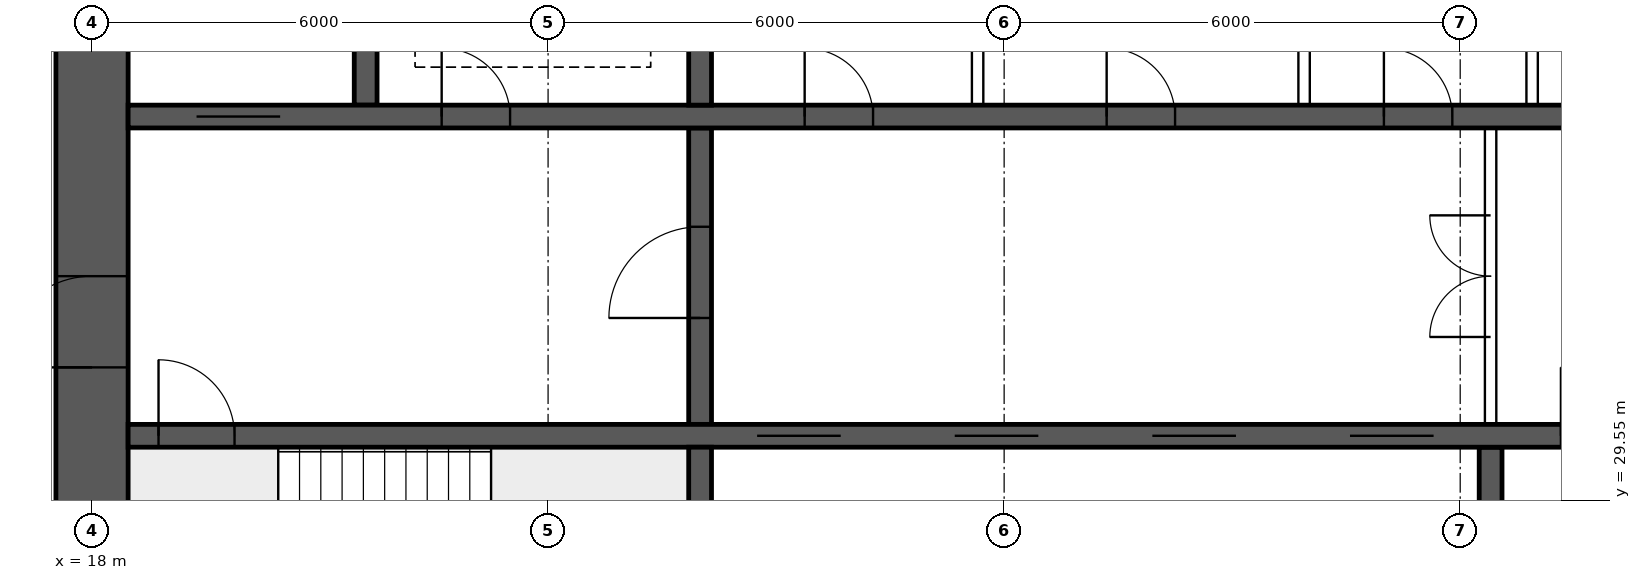
"""IFC4 building model, lengths in metres.
Left out: names, types, materials, properties, quantities, classifications, styles, units other than length and angle.
Written with IfcOpenShell. Run it as: python <this file> out.ifc"""

import sys

from ifc_helpers import new_model, si_unit, direction, frame, frame_2d, origin, place, context, subcontext, project, spatial, rectangle, extrude, element, fill, save


model = new_model("IFC4")
c1 = context("Model", 3, precision=1e-05, world=origin(), true_north=direction((0.0, 1.0)))
c2 = subcontext(c1, "Body", "Model", "MODEL_VIEW")
j1 = project(units=[si_unit("LENGTHUNIT", "METRE"), si_unit("PLANEANGLEUNIT", "RADIAN")], contexts=[c1])
p1 = place(None, origin())
s1 = spatial("IfcSite", under=j1, at=p1, CompositionType="ELEMENT")
p2 = place(p1, origin())
s2 = spatial("IfcBuilding", under=s1, at=p2, CompositionType="ELEMENT")
p3 = place(p2, frame((0.0, 0.0, 118.15)))
s3 = spatial("IfcBuildingStorey", under=s2, at=p3, CompositionType="ELEMENT", Elevation=118.15)
p4 = place(p3, frame((18.0, 26.275, 0.0), z_axis=(0.0, 0.0, 1.0), x_axis=(0.0, 1.0, 0.0)))
e1 = element("IfcWall", 1, at=p4, inside=s3, PredefinedType="SHEAR", context=c2, shape_type="SweptSolid", body=[
    extrude(rectangle(XDim=11.45, YDim=0.95, at=frame_2d((5.725, 0.0))), origin(), (0.0, 0.0, 1.0), 3.75),
])
p5 = place(p4, frame((5.025, 0.0, 0.0)))
e2 = element("IfcOpeningElement", 2, at=p5, cuts=e1, PredefinedType="OPENING", context=c2, shape_type="SweptSolid", body=[
    extrude(rectangle(XDim=1.2, YDim=2.1, at=frame_2d((0.6, 1.05))), frame((0.0, 0.485, 0.0), z_axis=(0.0, -1.0, 0.0), x_axis=(1.0, 0.0, 0.0)), (0.0, 0.0, 1.0), 0.97),
])
p6 = place(p3, frame((18.475, 30.4, 0.0), z_axis=(0.0, 0.0, 1.0), x_axis=(1.0, 0.0, 0.0)))
e3 = element("IfcWall", 3, at=p6, inside=s3, PredefinedType="SHEAR", context=c2, shape_type="SweptSolid", body=[
    extrude(rectangle(XDim=47.05, YDim=0.3, at=frame_2d((23.525, 0.0))), origin(), (0.0, 0.0, 1.0), 3.75),
])
p7 = place(p6, frame((0.4, 0.0, 0.0)))
e4 = element("IfcOpeningElement", 4, at=p7, cuts=e3, PredefinedType="OPENING", context=c2, shape_type="SweptSolid", body=[
    extrude(rectangle(XDim=1.0, YDim=2.1, at=frame_2d((0.5, 1.05))), frame((0.0, 0.16, 0.0), z_axis=(0.0, -1.0, 0.0), x_axis=(1.0, 0.0, 0.0)), (0.0, 0.0, 1.0), 0.32),
])
p8 = place(p6, frame((45.65, 0.0, 0.0)))
e5 = element("IfcOpeningElement", 5, at=p8, cuts=e3, PredefinedType="OPENING", context=c2, shape_type="SweptSolid", body=[
    extrude(rectangle(XDim=1.0, YDim=2.1, at=frame_2d((0.5, 1.05))), frame((0.0, 0.16, 0.0), z_axis=(0.0, -1.0, 0.0), x_axis=(1.0, 0.0, 0.0)), (0.0, 0.0, 1.0), 0.32),
])
p9 = place(p6, frame((8.275, 0.0, 0.0)))
e6 = element("IfcOpeningElement", 6, at=p9, cuts=e3, PredefinedType="OPENING", context=c2, shape_type="SweptSolid", body=[
    extrude(rectangle(XDim=1.1, YDim=2.1, at=frame_2d((0.55, 1.05))), frame((0.0, 0.16, 0.0), z_axis=(0.0, -1.0, 0.0), x_axis=(1.0, 0.0, 0.0)), (0.0, 0.0, 1.0), 0.32),
])
p10 = place(p6, frame((10.875, 0.0, 0.0)))
e7 = element("IfcOpeningElement", 7, at=p10, cuts=e3, PredefinedType="OPENING", context=c2, shape_type="SweptSolid", body=[
    extrude(rectangle(XDim=1.1, YDim=2.1, at=frame_2d((0.55, 1.05))), frame((0.0, 0.16, 0.0), z_axis=(0.0, -1.0, 0.0), x_axis=(1.0, 0.0, 0.0)), (0.0, 0.0, 1.0), 0.32),
])
p11 = place(p6, frame((13.475, 0.0, 0.0)))
e8 = element("IfcOpeningElement", 8, at=p11, cuts=e3, PredefinedType="OPENING", context=c2, shape_type="SweptSolid", body=[
    extrude(rectangle(XDim=1.1, YDim=2.1, at=frame_2d((0.55, 1.05))), frame((0.0, 0.16, 0.0), z_axis=(0.0, -1.0, 0.0), x_axis=(1.0, 0.0, 0.0)), (0.0, 0.0, 1.0), 0.32),
])
p12 = place(p6, frame((16.075, 0.0, 0.0)))
e9 = element("IfcOpeningElement", 9, at=p12, cuts=e3, PredefinedType="OPENING", context=c2, shape_type="SweptSolid", body=[
    extrude(rectangle(XDim=1.1, YDim=2.1, at=frame_2d((0.55, 1.05))), frame((0.0, 0.16, 0.0), z_axis=(0.0, -1.0, 0.0), x_axis=(1.0, 0.0, 0.0)), (0.0, 0.0, 1.0), 0.32),
])
p13 = place(p6, frame((18.85, 0.0, 0.0)))
e10 = element("IfcOpeningElement", 10, at=p13, cuts=e3, PredefinedType="OPENING", context=c2, shape_type="SweptSolid", body=[
    extrude(rectangle(XDim=0.9, YDim=2.1, at=frame_2d((0.45, 1.05))), frame((0.0, 0.16, 0.0), z_axis=(0.0, -1.0, 0.0), x_axis=(1.0, 0.0, 0.0)), (0.0, 0.0, 1.0), 0.32),
])
p14 = place(p6, frame((30.142, 0.0, 0.0)))
e11 = element("IfcOpeningElement", 11, at=p14, cuts=e3, PredefinedType="OPENING", context=c2, shape_type="SweptSolid", body=[
    extrude(rectangle(XDim=1.1, YDim=2.1, at=frame_2d((0.55, 1.05))), frame((0.0, 0.16, 0.0), z_axis=(0.0, -1.0, 0.0), x_axis=(1.0, 0.0, 0.0)), (0.0, 0.0, 1.0), 0.32),
])
p15 = place(p6, frame((33.675, 0.0, 0.0)))
e12 = element("IfcOpeningElement", 12, at=p15, cuts=e3, PredefinedType="OPENING", context=c2, shape_type="SweptSolid", body=[
    extrude(rectangle(XDim=1.1, YDim=2.1, at=frame_2d((0.55, 1.05))), frame((0.0, 0.16, 0.0), z_axis=(0.0, -1.0, 0.0), x_axis=(1.0, 0.0, 0.0)), (0.0, 0.0, 1.0), 0.32),
])
p16 = place(p6, frame((37.208, 0.0, 0.0)))
e13 = element("IfcOpeningElement", 13, at=p16, cuts=e3, PredefinedType="OPENING", context=c2, shape_type="SweptSolid", body=[
    extrude(rectangle(XDim=1.1, YDim=2.1, at=frame_2d((0.55, 1.05))), frame((0.0, 0.16, 0.0), z_axis=(0.0, -1.0, 0.0), x_axis=(1.0, 0.0, 0.0)), (0.0, 0.0, 1.0), 0.32),
])
p17 = place(p3, frame((18.475, 34.6, 0.0), z_axis=(0.0, 0.0, 1.0), x_axis=(1.0, 0.0, 0.0)))
e14 = element("IfcWall", 14, at=p17, inside=s3, PredefinedType="SHEAR", context=c2, shape_type="SweptSolid", body=[
    extrude(rectangle(XDim=47.05, YDim=0.3, at=frame_2d((23.525, 0.0))), origin(), (0.0, 0.0, 1.0), 3.75),
])
p18 = place(p17, frame((0.9, 0.0, 0.0)))
e15 = element("IfcOpeningElement", 15, at=p18, cuts=e14, PredefinedType="OPENING", context=c2, shape_type="SweptSolid", body=[
    extrude(rectangle(XDim=1.1, YDim=2.1, at=frame_2d((0.55, 1.05))), frame((0.0, 0.16, 0.0), z_axis=(0.0, -1.0, 0.0), x_axis=(1.0, 0.0, 0.0)), (0.0, 0.0, 1.0), 0.32),
])
p19 = place(p17, frame((45.05, 0.0, 0.0)))
e16 = element("IfcOpeningElement", 16, at=p19, cuts=e14, PredefinedType="OPENING", context=c2, shape_type="SweptSolid", body=[
    extrude(rectangle(XDim=1.1, YDim=2.1, at=frame_2d((0.55, 1.05))), frame((0.0, 0.16, 0.0), z_axis=(0.0, -1.0, 0.0), x_axis=(1.0, 0.0, 0.0)), (0.0, 0.0, 1.0), 0.32),
])
p20 = place(p17, frame((4.125, 0.0, 0.0)))
e17 = element("IfcOpeningElement", 17, at=p20, cuts=e14, PredefinedType="OPENING", context=c2, shape_type="SweptSolid", body=[
    extrude(rectangle(XDim=0.9, YDim=2.1, at=frame_2d((0.45, 1.05))), frame((0.0, 0.16, 0.0), z_axis=(0.0, -1.0, 0.0), x_axis=(1.0, 0.0, 0.0)), (0.0, 0.0, 1.0), 0.32),
])
p21 = place(p17, frame((42.025, 0.0, 0.0)))
e18 = element("IfcOpeningElement", 18, at=p21, cuts=e14, PredefinedType="OPENING", context=c2, shape_type="SweptSolid", body=[
    extrude(rectangle(XDim=0.9, YDim=2.1, at=frame_2d((0.45, 1.05))), frame((0.0, 0.16, 0.0), z_axis=(0.0, -1.0, 0.0), x_axis=(1.0, 0.0, 0.0)), (0.0, 0.0, 1.0), 0.32),
])
p22 = place(p17, frame((8.9, 0.0, 0.0)))
e19 = element("IfcOpeningElement", 19, at=p22, cuts=e14, PredefinedType="OPENING", context=c2, shape_type="SweptSolid", body=[
    extrude(rectangle(XDim=0.9, YDim=2.1, at=frame_2d((0.45, 1.05))), frame((0.0, 0.16, 0.0), z_axis=(0.0, -1.0, 0.0), x_axis=(1.0, 0.0, 0.0)), (0.0, 0.0, 1.0), 0.32),
])
p23 = place(p17, frame((12.874, 0.0, 0.0)))
e20 = element("IfcOpeningElement", 20, at=p23, cuts=e14, PredefinedType="OPENING", context=c2, shape_type="SweptSolid", body=[
    extrude(rectangle(XDim=0.9, YDim=2.1, at=frame_2d((0.45, 1.05))), frame((0.0, 0.16, 0.0), z_axis=(0.0, -1.0, 0.0), x_axis=(1.0, 0.0, 0.0)), (0.0, 0.0, 1.0), 0.32),
])
p24 = place(p17, frame((16.521, 0.0, 0.0)))
e21 = element("IfcOpeningElement", 21, at=p24, cuts=e14, PredefinedType="OPENING", context=c2, shape_type="SweptSolid", body=[
    extrude(rectangle(XDim=0.9, YDim=2.1, at=frame_2d((0.45, 1.05))), frame((0.0, 0.16, 0.0), z_axis=(0.0, -1.0, 0.0), x_axis=(1.0, 0.0, 0.0)), (0.0, 0.0, 1.0), 0.32),
])
p25 = place(p17, frame((20.28, 0.0, 0.0)))
e22 = element("IfcOpeningElement", 22, at=p25, cuts=e14, PredefinedType="OPENING", context=c2, shape_type="SweptSolid", body=[
    extrude(rectangle(XDim=0.9, YDim=2.1, at=frame_2d((0.45, 1.05))), frame((0.0, 0.16, 0.0), z_axis=(0.0, -1.0, 0.0), x_axis=(1.0, 0.0, 0.0)), (0.0, 0.0, 1.0), 0.32),
])
p26 = place(p17, frame((24.686, 0.0, 0.0)))
e23 = element("IfcOpeningElement", 23, at=p26, cuts=e14, PredefinedType="OPENING", context=c2, shape_type="SweptSolid", body=[
    extrude(rectangle(XDim=0.9, YDim=2.1, at=frame_2d((0.45, 1.05))), frame((0.0, 0.16, 0.0), z_axis=(0.0, -1.0, 0.0), x_axis=(1.0, 0.0, 0.0)), (0.0, 0.0, 1.0), 0.32),
])
p27 = place(p17, frame((27.483, 0.0, 0.0)))
e24 = element("IfcOpeningElement", 24, at=p27, cuts=e14, PredefinedType="OPENING", context=c2, shape_type="SweptSolid", body=[
    extrude(rectangle(XDim=0.9, YDim=2.1, at=frame_2d((0.45, 1.05))), frame((0.0, 0.16, 0.0), z_axis=(0.0, -1.0, 0.0), x_axis=(1.0, 0.0, 0.0)), (0.0, 0.0, 1.0), 0.32),
])
p28 = place(p17, frame((29.856, 0.0, 0.0)))
e25 = element("IfcOpeningElement", 25, at=p28, cuts=e14, PredefinedType="OPENING", context=c2, shape_type="SweptSolid", body=[
    extrude(rectangle(XDim=0.9, YDim=2.1, at=frame_2d((0.45, 1.05))), frame((0.0, 0.16, 0.0), z_axis=(0.0, -1.0, 0.0), x_axis=(1.0, 0.0, 0.0)), (0.0, 0.0, 1.0), 0.32),
])
p29 = place(p17, frame((33.706, 0.0, 0.0)))
e26 = element("IfcOpeningElement", 26, at=p29, cuts=e14, PredefinedType="OPENING", context=c2, shape_type="SweptSolid", body=[
    extrude(rectangle(XDim=0.9, YDim=2.1, at=frame_2d((0.45, 1.05))), frame((0.0, 0.16, 0.0), z_axis=(0.0, -1.0, 0.0), x_axis=(1.0, 0.0, 0.0)), (0.0, 0.0, 1.0), 0.32),
])
p30 = place(p17, frame((37.454, 0.0, 0.0)))
e27 = element("IfcOpeningElement", 27, at=p30, cuts=e14, PredefinedType="OPENING", context=c2, shape_type="SweptSolid", body=[
    extrude(rectangle(XDim=0.9, YDim=2.1, at=frame_2d((0.45, 1.05))), frame((0.0, 0.16, 0.0), z_axis=(0.0, -1.0, 0.0), x_axis=(1.0, 0.0, 0.0)), (0.0, 0.0, 1.0), 0.32),
])
p31 = place(p3, frame((26.0, 26.275, 0.0), z_axis=(0.0, 0.0, 1.0), x_axis=(0.0, 1.0, 0.0)))
e28 = element("IfcWall", 28, at=p31, inside=s3, PredefinedType="SHEAR", context=c2, shape_type="SweptSolid", body=[
    extrude(rectangle(XDim=3.975, YDim=0.3, at=frame_2d((1.988, 0.0))), origin(), (0.0, 0.0, 1.0), 3.75),
])
p32 = place(p3, frame((26.0, 30.55, 0.0), z_axis=(0.0, 0.0, 1.0), x_axis=(0.0, 1.0, 0.0)))
e29 = element("IfcWall", 29, at=p32, inside=s3, PredefinedType="SHEAR", context=c2, shape_type="SweptSolid", body=[
    extrude(rectangle(XDim=3.9, YDim=0.3, at=frame_2d((1.95, 0.0))), origin(), (0.0, 0.0, 1.0), 3.75),
])
p33 = place(p32, frame((1.4, 0.0, 0.0)))
e30 = element("IfcOpeningElement", 30, at=p33, cuts=e29, PredefinedType="OPENING", context=c2, shape_type="SweptSolid", body=[
    extrude(rectangle(XDim=1.2, YDim=2.1, at=frame_2d((0.6, 1.05))), frame((0.0, 0.16, 0.0), z_axis=(0.0, -1.0, 0.0), x_axis=(1.0, 0.0, 0.0)), (0.0, 0.0, 1.0), 0.32),
])
for number, where, z_axis, x_axis in (
    (31, (21.6, 34.75, 0.0), (0.0, 0.0, 1.0), (0.0, 1.0, 0.0)),
    (32, (26.0, 34.75, 0.0), (0.0, 0.0, 1.0), (0.0, 1.0, 0.0)),
):
    element("IfcWall", number, at=place(p3, frame(where, z_axis=z_axis, x_axis=x_axis)), inside=s3, PredefinedType="SHEAR", context=c2, shape_type="SweptSolid", body=[
        extrude(rectangle(XDim=2.975, YDim=0.3, at=frame_2d((1.488, 0.0))), origin(), (0.0, 0.0, 1.0), 3.75),
    ])
p34 = place(p3, frame((36.4, 26.275, 0.0), z_axis=(0.0, 0.0, 1.0), x_axis=(0.0, 1.0, 0.0)))
e33 = element("IfcWall", 33, at=p34, inside=s3, PredefinedType="SHEAR", context=c2, shape_type="SweptSolid", body=[
    extrude(rectangle(XDim=3.975, YDim=0.3, at=frame_2d((1.988, 0.0))), origin(), (0.0, 0.0, 1.0), 3.75),
])
p35 = place(p3, frame((36.4, 30.55, 0.0), z_axis=(0.0, 0.0, 1.0), x_axis=(0.0, 1.0, 0.0)))
e34 = element("IfcWall", 34, at=p35, inside=s3, PredefinedType="SOLIDWALL", context=c2, shape_type="SweptSolid", body=[
    extrude(rectangle(XDim=3.9, YDim=0.15, at=frame_2d((1.95, 0.0))), origin(), (0.0, 0.0, 1.0), 3.5),
])
p36 = place(p35, frame((1.15, 0.0, 0.0)))
e35 = element("IfcOpeningElement", 35, at=p36, cuts=e34, PredefinedType="OPENING", context=c2, shape_type="SweptSolid", body=[
    extrude(rectangle(XDim=1.6, YDim=2.1, at=frame_2d((0.8, 1.05))), frame((0.0, 0.085, 0.0), z_axis=(0.0, -1.0, 0.0), x_axis=(1.0, 0.0, 0.0)), (0.0, 0.0, 1.0), 0.17),
])
for number, where, z_axis, x_axis in (
    (36, (29.651, 34.75, 0.0), (0.0, 0.0, 1.0), (0.0, 1.0, 0.0)),
    (37, (33.946, 34.75, 0.0), (0.0, 0.0, 1.0), (0.0, 1.0, 0.0)),
    (38, (36.946, 34.75, 0.0), (0.0, 0.0, 1.0), (0.0, 1.0, 0.0)),
):
    element("IfcWall", number, at=place(p3, frame(where, z_axis=z_axis, x_axis=x_axis)), inside=s3, PredefinedType="SOLIDWALL", context=c2, shape_type="SweptSolid", body=[
        extrude(rectangle(XDim=2.975, YDim=0.15, at=frame_2d((1.488, 0.0))), origin(), (0.0, 0.0, 1.0), 3.5),
    ])
p37 = place(p36, origin())
e39 = element("IfcDoor", 39, at=p37, inside=s3, OperationType="DOUBLE_DOOR_SINGLE_SWING", PredefinedType="DOOR", context=c2, shape_type="SweptSolid", body=[
    extrude(rectangle(XDim=1.6, YDim=2.1, at=frame_2d((0.8, 1.05))), frame((0.0, 0.025, 0.0), z_axis=(0.0, -1.0, 0.0), x_axis=(1.0, 0.0, 0.0)), (0.0, 0.0, 1.0), 0.05),
])
fill(e35, e39)
p38 = place(p5, origin())
e40 = element("IfcDoor", 40, at=p38, inside=s3, OperationType="SINGLE_SWING_LEFT", PredefinedType="DOOR", context=c2, shape_type="SweptSolid", body=[
    extrude(rectangle(XDim=1.2, YDim=2.1, at=frame_2d((0.6, 1.05))), frame((0.0, 0.025, 0.0), z_axis=(0.0, -1.0, 0.0), x_axis=(1.0, 0.0, 0.0)), (0.0, 0.0, 1.0), 0.05),
])
fill(e2, e40)
p39 = place(p7, origin())
e41 = element("IfcDoor", 41, at=p39, inside=s3, OperationType="SINGLE_SWING_LEFT", PredefinedType="DOOR", context=c2, shape_type="SweptSolid", body=[
    extrude(rectangle(XDim=1.0, YDim=2.1, at=frame_2d((0.5, 1.05))), frame((0.0, 0.025, 0.0), z_axis=(0.0, -1.0, 0.0), x_axis=(1.0, 0.0, 0.0)), (0.0, 0.0, 1.0), 0.05),
])
fill(e4, e41)
p40 = place(p18, origin())
e42 = element("IfcDoor", 42, at=p40, inside=s3, OperationType="DOUBLE_DOOR_SLIDING", PredefinedType="DOOR", context=c2, shape_type="SweptSolid", body=[
    extrude(rectangle(XDim=1.1, YDim=2.1, at=frame_2d((0.55, 1.05))), frame((0.0, 0.025, 0.0), z_axis=(0.0, -1.0, 0.0), x_axis=(1.0, 0.0, 0.0)), (0.0, 0.0, 1.0), 0.05),
])
fill(e15, e42)
p41 = place(p20, origin())
e43 = element("IfcDoor", 43, at=p41, inside=s3, OperationType="SINGLE_SWING_LEFT", PredefinedType="DOOR", context=c2, shape_type="SweptSolid", body=[
    extrude(rectangle(XDim=0.9, YDim=2.1, at=frame_2d((0.45, 1.05))), frame((0.0, 0.025, 0.0), z_axis=(0.0, -1.0, 0.0), x_axis=(1.0, 0.0, 0.0)), (0.0, 0.0, 1.0), 0.05),
])
fill(e17, e43)
p42 = place(p33, origin())
e44 = element("IfcDoor", 44, at=p42, inside=s3, OperationType="SINGLE_SWING_LEFT", PredefinedType="DOOR", context=c2, shape_type="SweptSolid", body=[
    extrude(rectangle(XDim=1.2, YDim=2.1, at=frame_2d((0.6, 1.05))), frame((0.0, 0.025, 0.0), z_axis=(0.0, -1.0, 0.0), x_axis=(1.0, 0.0, 0.0)), (0.0, 0.0, 1.0), 0.05),
])
fill(e30, e44)
p43 = place(p22, origin())
e45 = element("IfcDoor", 45, at=p43, inside=s3, OperationType="SINGLE_SWING_LEFT", PredefinedType="DOOR", context=c2, shape_type="SweptSolid", body=[
    extrude(rectangle(XDim=0.9, YDim=2.1, at=frame_2d((0.45, 1.05))), frame((0.0, 0.025, 0.0), z_axis=(0.0, -1.0, 0.0), x_axis=(1.0, 0.0, 0.0)), (0.0, 0.0, 1.0), 0.05),
])
fill(e19, e45)
p44 = place(p23, origin())
e46 = element("IfcDoor", 46, at=p44, inside=s3, OperationType="SINGLE_SWING_LEFT", PredefinedType="DOOR", context=c2, shape_type="SweptSolid", body=[
    extrude(rectangle(XDim=0.9, YDim=2.1, at=frame_2d((0.45, 1.05))), frame((0.0, 0.025, 0.0), z_axis=(0.0, -1.0, 0.0), x_axis=(1.0, 0.0, 0.0)), (0.0, 0.0, 1.0), 0.05),
])
fill(e20, e46)
p45 = place(p24, origin())
e47 = element("IfcDoor", 47, at=p45, inside=s3, OperationType="SINGLE_SWING_LEFT", PredefinedType="DOOR", context=c2, shape_type="SweptSolid", body=[
    extrude(rectangle(XDim=0.9, YDim=2.1, at=frame_2d((0.45, 1.05))), frame((0.0, 0.025, 0.0), z_axis=(0.0, -1.0, 0.0), x_axis=(1.0, 0.0, 0.0)), (0.0, 0.0, 1.0), 0.05),
])
fill(e21, e47)
p46 = place(p9, origin())
e48 = element("IfcDoor", 48, at=p46, inside=s3, OperationType="DOUBLE_DOOR_SLIDING", PredefinedType="DOOR", context=c2, shape_type="SweptSolid", body=[
    extrude(rectangle(XDim=1.1, YDim=2.1, at=frame_2d((0.55, 1.05))), frame((0.0, 0.025, 0.0), z_axis=(0.0, -1.0, 0.0), x_axis=(1.0, 0.0, 0.0)), (0.0, 0.0, 1.0), 0.05),
])
fill(e6, e48)
p47 = place(p10, origin())
e49 = element("IfcDoor", 49, at=p47, inside=s3, OperationType="DOUBLE_DOOR_SLIDING", PredefinedType="DOOR", context=c2, shape_type="SweptSolid", body=[
    extrude(rectangle(XDim=1.1, YDim=2.1, at=frame_2d((0.55, 1.05))), frame((0.0, 0.025, 0.0), z_axis=(0.0, -1.0, 0.0), x_axis=(1.0, 0.0, 0.0)), (0.0, 0.0, 1.0), 0.05),
])
fill(e7, e49)
p48 = place(p11, origin())
e50 = element("IfcDoor", 50, at=p48, inside=s3, OperationType="DOUBLE_DOOR_SLIDING", PredefinedType="DOOR", context=c2, shape_type="SweptSolid", body=[
    extrude(rectangle(XDim=1.1, YDim=2.1, at=frame_2d((0.55, 1.05))), frame((0.0, 0.025, 0.0), z_axis=(0.0, -1.0, 0.0), x_axis=(1.0, 0.0, 0.0)), (0.0, 0.0, 1.0), 0.05),
])
fill(e8, e50)
p49 = place(p12, origin())
e51 = element("IfcDoor", 51, at=p49, inside=s3, OperationType="DOUBLE_DOOR_SLIDING", PredefinedType="DOOR", context=c2, shape_type="SweptSolid", body=[
    extrude(rectangle(XDim=1.1, YDim=2.1, at=frame_2d((0.55, 1.05))), frame((0.0, 0.025, 0.0), z_axis=(0.0, -1.0, 0.0), x_axis=(1.0, 0.0, 0.0)), (0.0, 0.0, 1.0), 0.05),
])
fill(e9, e51)
save(model, sys.argv[1])
